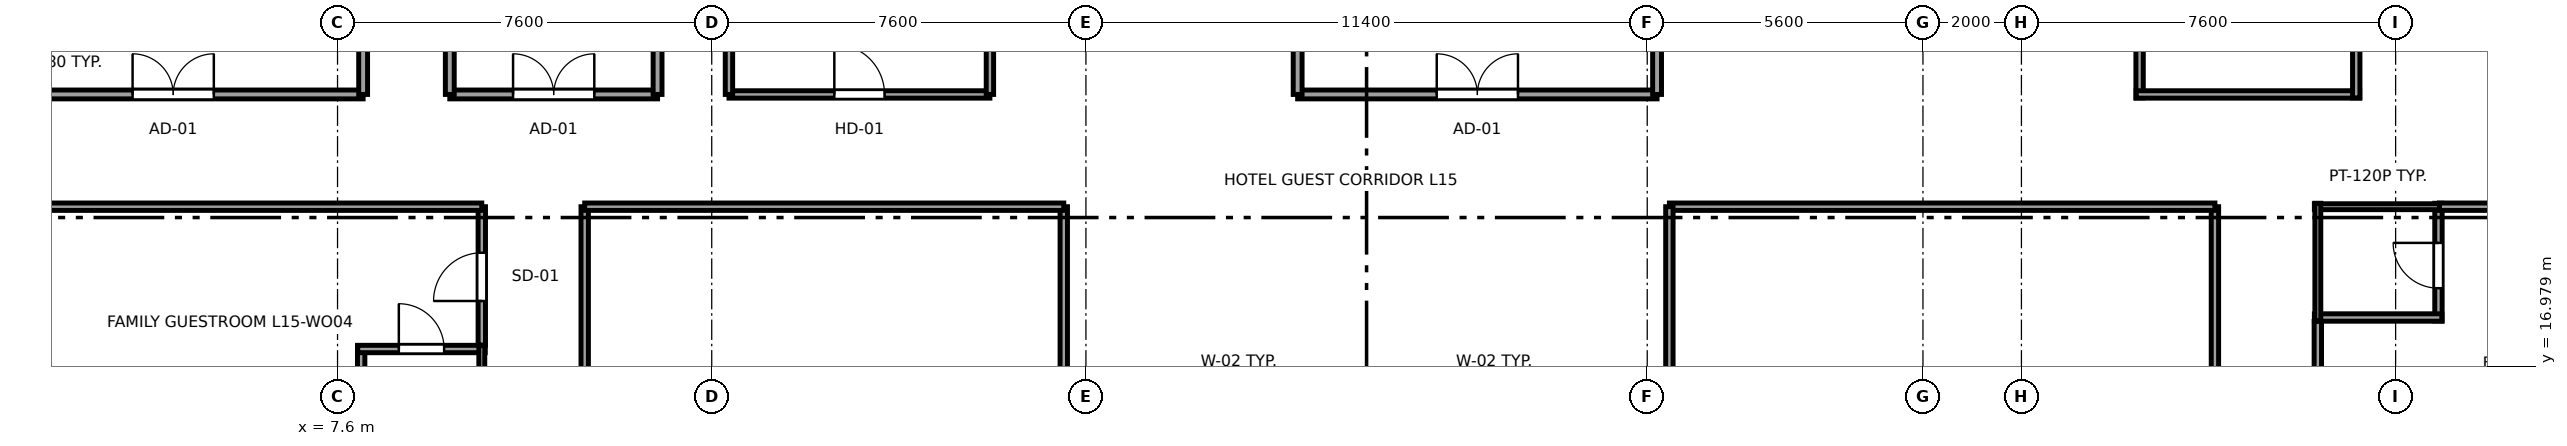
"""IFC4 building model, lengths in metres.
Left out: names, types, materials, properties, quantities, classifications, styles, units other than length and angle.
Written with IfcOpenShell. Run it as: python <this file> out.ifc"""

import sys

from ifc_helpers import new_model, si_unit, direction, frame, frame_2d, origin, place, context, subcontext, project, spatial, rectangle, extrude, source, transform, mapped, element, fill, save


model = new_model("IFC4")
c1 = context("Model", 3, precision=1e-05, world=origin(), true_north=direction((0.0, 1.0)))
c2 = subcontext(c1, "Body", "Model", "MODEL_VIEW")
j1 = project(units=[si_unit("LENGTHUNIT", "METRE"), si_unit("PLANEANGLEUNIT", "RADIAN")], contexts=[c1])
p1 = place(None, origin())
s1 = spatial("IfcSite", under=j1, at=p1, CompositionType="ELEMENT")
p2 = place(p1, origin())
s2 = spatial("IfcBuilding", under=s1, at=p2, CompositionType="ELEMENT")
p3 = place(p2, frame((0.0, 0.0, 63.95)))
s3 = spatial("IfcBuildingStorey", under=s2, at=p3, CompositionType="ELEMENT", Elevation=63.95)
p4 = place(p3, frame((8.08, 15.41, 0.0), z_axis=(0.0, 0.0, 1.0), x_axis=(0.0, 1.0, 0.0)))
e1 = element("IfcWall", 1, at=p4, inside=s3, PredefinedType="PARTITIONING", context=c2, shape_type="SweptSolid", body=[
    extrude(rectangle(XDim=1.99, YDim=0.15, at=frame_2d((0.995, 0.0))), origin(), (0.0, 0.0, 1.0), 3.37),
])
p5 = place(p3, frame((8.01, 17.33, 0.0), z_axis=(0.0, 0.0, 1.0), x_axis=(1.0, 0.0, 0.0)))
e2 = element("IfcWall", 2, at=p5, inside=s3, PredefinedType="PARTITIONING", context=c2, shape_type="SweptSolid", body=[
    extrude(rectangle(XDim=2.59, YDim=0.15, at=frame_2d((1.295, 0.0))), origin(), (0.0, 0.0, 1.0), 3.37),
])
p6 = place(p5, frame((0.835, 0.0, 0.0)))
e3 = element("IfcOpeningElement", 3, at=p6, cuts=e2, PredefinedType="OPENING", context=c2, shape_type="SweptSolid", body=[
    extrude(rectangle(XDim=0.92, YDim=2.01, at=frame_2d((0.46, 1.005))), frame((0.0, 0.085, 0.0), z_axis=(0.0, -1.0, 0.0), x_axis=(1.0, 0.0, 0.0)), (0.0, 0.0, 1.0), 0.17),
])
p7 = place(p3, frame((10.53, 15.41, 0.0), z_axis=(0.0, 0.0, 1.0), x_axis=(0.0, 1.0, 0.0)))
e4 = element("IfcWall", 4, at=p7, inside=s3, PredefinedType="PLUMBINGWALL", context=c2, shape_type="SweptSolid", body=[
    extrude(rectangle(XDim=1.99, YDim=0.12, at=frame_2d((0.995, 0.0))), origin(), (0.0, 0.0, 1.0), 3.37),
])
p8 = place(p3, frame((50.27, 17.9, 0.0), z_axis=(0.0, 0.0, 1.0), x_axis=(0.0, 1.0, 0.0)))
e5 = element("IfcWall", 5, at=p8, inside=s3, PredefinedType="PARTITIONING", context=c2, shape_type="SweptSolid", body=[
    extrude(rectangle(XDim=2.39, YDim=0.15, at=frame_2d((1.195, 0.0))), origin(), (0.0, 0.0, 1.0), 3.37),
])
p9 = place(p8, frame((0.665, 0.0, 0.0)))
e6 = element("IfcOpeningElement", 6, at=p9, cuts=e5, PredefinedType="OPENING", context=c2, shape_type="SweptSolid", body=[
    extrude(rectangle(XDim=0.92, YDim=2.01, at=frame_2d((0.46, 1.005))), frame((0.0, 0.085, 0.0), z_axis=(0.0, -1.0, 0.0), x_axis=(1.0, 0.0, 0.0)), (0.0, 0.0, 1.0), 0.17),
])
p10 = place(p3, frame((47.75, 17.97, 0.0), z_axis=(0.0, 0.0, 1.0), x_axis=(1.0, 0.0, 0.0)))
e7 = element("IfcWall", 7, at=p10, inside=s3, PredefinedType="PARTITIONING", context=c2, shape_type="SweptSolid", body=[
    extrude(rectangle(XDim=2.59, YDim=0.15, at=frame_2d((1.295, 0.0))), origin(), (0.0, 0.0, 1.0), 3.37),
])
p11 = place(p3, frame((47.75, 20.22, 0.0), z_axis=(0.0, 0.0, 1.0), x_axis=(1.0, 0.0, 0.0)))
e8 = element("IfcWall", 8, at=p11, inside=s3, PredefinedType="PLUMBINGWALL", context=c2, shape_type="SweptSolid", body=[
    extrude(rectangle(XDim=2.59, YDim=0.12, at=frame_2d((1.295, 0.0))), origin(), (0.0, 0.0, 1.0), 3.37),
])
p12 = place(p3, frame((47.82, 17.9, 0.0), z_axis=(0.0, 0.0, 1.0), x_axis=(0.0, 1.0, 0.0)))
e9 = element("IfcWall", 9, at=p12, inside=s3, PredefinedType="PLUMBINGWALL", context=c2, shape_type="SweptSolid", body=[
    extrude(rectangle(XDim=2.39, YDim=0.12, at=frame_2d((1.195, 0.0))), origin(), (0.0, 0.0, 1.0), 3.37),
])
p13 = place(p3, frame((10.53, 17.41, 0.0), z_axis=(0.0, 0.0, 1.0), x_axis=(0.0, 1.0, 0.0)))
e10 = element("IfcWall", 10, at=p13, inside=s3, PredefinedType="PARTITIONING", context=c2, shape_type="SweptSolid", body=[
    extrude(rectangle(XDim=2.81, YDim=0.15, at=frame_2d((1.405, 0.0))), origin(), (0.0, 0.0, 1.0), 3.37),
])
p14 = place(p13, frame((0.895, 0.0, 0.0)))
e11 = element("IfcOpeningElement", 11, at=p14, cuts=e10, PredefinedType="OPENING", context=c2, shape_type="SweptSolid", body=[
    extrude(rectangle(XDim=0.98, YDim=2.12, at=frame_2d((0.49, 1.06))), frame((0.0, 0.085, 0.0), z_axis=(0.0, -1.0, 0.0), x_axis=(1.0, 0.0, 0.0)), (0.0, 0.0, 1.0), 0.17),
])
p15 = place(p3, frame((0.405, 20.22, 0.0), z_axis=(0.0, 0.0, 1.0), x_axis=(1.0, 0.0, 0.0)))
e12 = element("IfcWall", 12, at=p15, inside=s3, PredefinedType="PARTITIONING", context=c2, shape_type="SweptSolid", body=[
    extrude(rectangle(XDim=10.125, YDim=0.15, at=frame_2d((5.062, 0.0))), origin(), (0.0, 0.0, 1.0), 3.37),
])
p16 = place(p3, frame((12.62, 12.21, 0.0), z_axis=(0.0, 0.0, 1.0), x_axis=(0.0, 1.0, 0.0)))
e13 = element("IfcWall", 13, at=p16, inside=s3, PredefinedType="PARTITIONING", context=c2, shape_type="SweptSolid", body=[
    extrude(rectangle(XDim=8.01, YDim=0.15, at=frame_2d((4.005, 0.0))), origin(), (0.0, 0.0, 1.0), 3.37),
])
p17 = place(p16, frame((3.495, 0.0, 0.0)))
e14 = element("IfcOpeningElement", 14, at=p17, cuts=e13, PredefinedType="OPENING", context=c2, shape_type="SweptSolid", body=[
    extrude(rectangle(XDim=0.98, YDim=2.12, at=frame_2d((0.49, 1.06))), frame((0.0, 0.085, 0.0), z_axis=(0.0, -1.0, 0.0), x_axis=(1.0, 0.0, 0.0)), (0.0, 0.0, 1.0), 0.17),
])
p18 = place(p3, frame((22.35, 9.88, 0.0), z_axis=(0.0, 0.0, 1.0), x_axis=(0.0, 1.0, 0.0)))
e15 = element("IfcWall", 15, at=p18, inside=s3, PredefinedType="PARTITIONING", context=c2, shape_type="SweptSolid", body=[
    extrude(rectangle(XDim=10.34, YDim=0.15, at=frame_2d((5.17, 0.0))), origin(), (0.0, 0.0, 1.0), 3.37),
])
p19 = place(p3, frame((12.62, 20.22, 0.0), z_axis=(0.0, 0.0, 1.0), x_axis=(1.0, 0.0, 0.0)))
e16 = element("IfcWall", 16, at=p19, inside=s3, PredefinedType="PARTITIONING", context=c2, shape_type="SweptSolid", body=[
    extrude(rectangle(XDim=9.73, YDim=0.15, at=frame_2d((4.865, 0.0))), origin(), (0.0, 0.0, 1.0), 2.954),
])
p20 = place(p3, frame((45.73, 12.61, 0.0), z_axis=(0.0, 0.0, 1.0), x_axis=(0.0, 1.0, 0.0)))
e17 = element("IfcWall", 17, at=p20, inside=s3, PredefinedType="PARTITIONING", context=c2, shape_type="SweptSolid", body=[
    extrude(rectangle(XDim=7.61, YDim=0.15, at=frame_2d((3.805, 0.0))), origin(), (0.0, 0.0, 1.0), 2.954),
])
p21 = place(p20, frame((3.295, 0.0, 0.0)))
e18 = element("IfcOpeningElement", 18, at=p21, cuts=e17, PredefinedType="OPENING", context=c2, shape_type="SweptSolid", body=[
    extrude(rectangle(XDim=0.98, YDim=2.12, at=frame_2d((0.49, 1.06))), frame((0.0, 0.085, 0.0), z_axis=(0.0, -1.0, 0.0), x_axis=(1.0, 0.0, 0.0)), (0.0, 0.0, 1.0), 0.17),
])
p22 = place(p3, frame((34.65, 20.22, 0.0), z_axis=(0.0, 0.0, 1.0), x_axis=(1.0, 0.0, 0.0)))
e19 = element("IfcWall", 19, at=p22, inside=s3, PredefinedType="PARTITIONING", context=c2, shape_type="SweptSolid", body=[
    extrude(rectangle(XDim=11.08, YDim=0.15, at=frame_2d((5.54, 0.0))), origin(), (0.0, 0.0, 1.0), 2.954),
])
p23 = place(p3, frame((34.65, 10.28, 0.0), z_axis=(0.0, 0.0, 1.0), x_axis=(0.0, 1.0, 0.0)))
e20 = element("IfcWall", 20, at=p23, inside=s3, PredefinedType="PARTITIONING", context=c2, shape_type="SweptSolid", body=[
    extrude(rectangle(XDim=9.94, YDim=0.15, at=frame_2d((4.97, 0.0))), origin(), (0.0, 0.0, 1.0), 3.37),
])
p24 = place(p3, frame((47.82, 13.88, 0.0), z_axis=(0.0, 0.0, 1.0), x_axis=(0.0, 1.0, 0.0)))
e21 = element("IfcWall", 21, at=p24, inside=s3, PredefinedType="PARTITIONING", context=c2, shape_type="SweptSolid", body=[
    extrude(rectangle(XDim=4.01, YDim=0.15, at=frame_2d((2.005, 0.0))), origin(), (0.0, 0.0, 1.0), 3.37),
])
p25 = place(p24, frame((1.495, 0.0, 0.0)))
e22 = element("IfcOpeningElement", 22, at=p25, cuts=e21, PredefinedType="OPENING", context=c2, shape_type="SweptSolid", body=[
    extrude(rectangle(XDim=0.98, YDim=2.12, at=frame_2d((0.49, 1.06))), frame((0.0, 0.085, 0.0), z_axis=(0.0, -1.0, 0.0), x_axis=(1.0, 0.0, 0.0)), (0.0, 0.0, 1.0), 0.17),
])
p26 = place(p3, frame((50.29, 20.22, 0.0), z_axis=(0.0, 0.0, 1.0), x_axis=(1.0, 0.0, 0.0)))
e23 = element("IfcWall", 23, at=p26, inside=s3, PredefinedType="PARTITIONING", context=c2, shape_type="SweptSolid", body=[
    extrude(rectangle(XDim=6.305, YDim=0.15, at=frame_2d((3.152, 0.0))), origin(), (0.0, 0.0, 1.0), 3.37),
])
p27 = place(p3, frame((0.405, 22.5, 0.0), z_axis=(0.0, 0.0, 1.0), x_axis=(1.0, 0.0, 0.0)))
e24 = element("IfcWall", 24, at=p27, inside=s3, PredefinedType="PARTITIONING", context=c2, shape_type="SweptSolid", body=[
    extrude(rectangle(XDim=7.715, YDim=0.18, at=frame_2d((3.857, 0.0))), origin(), (0.0, 0.0, 1.0), 3.37),
])
p28 = place(p27, frame((3.032, 0.0, 0.0)))
e25 = element("IfcOpeningElement", 25, at=p28, cuts=e24, PredefinedType="OPENING", context=c2, shape_type="SweptSolid", body=[
    extrude(rectangle(XDim=1.65, YDim=2.15, at=frame_2d((0.825, 1.075))), frame((0.0, 0.1, 0.0), z_axis=(0.0, -1.0, 0.0), x_axis=(1.0, 0.0, 0.0)), (0.0, 0.0, 1.0), 0.2),
])
p29 = place(p3, frame((8.12, 22.5, 0.0), z_axis=(0.0, 0.0, 1.0), x_axis=(0.0, 1.0, 0.0)))
e26 = element("IfcWall", 26, at=p29, inside=s3, PredefinedType="PARTITIONING", context=c2, shape_type="SweptSolid", body=[
    extrude(rectangle(XDim=1.9, YDim=0.18, at=frame_2d((0.95, 0.0))), origin(), (0.0, 0.0, 1.0), 3.37),
])
p30 = place(p3, frame((44.2, 22.43, 0.0), z_axis=(0.0, 0.0, 1.0), x_axis=(0.0, 1.0, 0.0)))
e27 = element("IfcWall", 27, at=p30, inside=s3, PredefinedType="PARTITIONING", context=c2, shape_type="SweptSolid", body=[
    extrude(rectangle(XDim=3.94, YDim=0.15, at=frame_2d((1.97, 0.0))), origin(), (0.0, 0.0, 1.0), 3.37),
])
p31 = place(p30, frame((1.34, 0.0, 0.0)))
e28 = element("IfcOpeningElement", 28, at=p31, cuts=e27, PredefinedType="OPENING", context=c2, shape_type="SweptSolid", body=[
    extrude(rectangle(XDim=0.92, YDim=2.01, at=frame_2d((0.46, 1.005))), frame((0.0, 0.085, 0.0), z_axis=(0.0, -1.0, 0.0), x_axis=(1.0, 0.0, 0.0)), (0.0, 0.0, 1.0), 0.17),
])
p32 = place(p3, frame((44.13, 22.5, 0.0), z_axis=(0.0, 0.0, 1.0), x_axis=(1.0, 0.0, 0.0)))
e29 = element("IfcWall", 29, at=p32, inside=s3, PredefinedType="PARTITIONING", context=c2, shape_type="SweptSolid", body=[
    extrude(rectangle(XDim=4.54, YDim=0.15, at=frame_2d((2.27, 0.0))), origin(), (0.0, 0.0, 1.0), 3.37),
])
p33 = place(p3, frame((48.6, 22.43, 0.0), z_axis=(0.0, 0.0, 1.0), x_axis=(0.0, 1.0, 0.0)))
e30 = element("IfcWall", 30, at=p33, inside=s3, PredefinedType="PARTITIONING", context=c2, shape_type="SweptSolid", body=[
    extrude(rectangle(XDim=3.94, YDim=0.15, at=frame_2d((1.97, 0.0))), origin(), (0.0, 0.0, 1.0), 3.37),
])
p34 = place(p3, frame((9.88, 22.5, 0.0), z_axis=(0.0, 0.0, 1.0), x_axis=(1.0, 0.0, 0.0)))
e31 = element("IfcWall", 31, at=p34, inside=s3, PredefinedType="PARTITIONING", context=c2, shape_type="SweptSolid", body=[
    extrude(rectangle(XDim=4.22, YDim=0.18, at=frame_2d((2.11, 0.0))), origin(), (0.0, 0.0, 1.0), 3.37),
])
p35 = place(p34, frame((1.285, 0.0, 0.0)))
e32 = element("IfcOpeningElement", 32, at=p35, cuts=e31, PredefinedType="OPENING", context=c2, shape_type="SweptSolid", body=[
    extrude(rectangle(XDim=1.65, YDim=2.15, at=frame_2d((0.825, 1.075))), frame((0.0, 0.1, 0.0), z_axis=(0.0, -1.0, 0.0), x_axis=(1.0, 0.0, 0.0)), (0.0, 0.0, 1.0), 0.2),
])
for number, where, z_axis, x_axis in (
    (33, (9.88, 22.5, 0.0), (0.0, 0.0, 1.0), (0.0, 1.0, 0.0)),
    (34, (14.1, 22.5, 0.0), (0.0, 0.0, 1.0), (0.0, 1.0, 0.0)),
):
    element("IfcWall", number, at=place(p3, frame(where, z_axis=z_axis, x_axis=x_axis)), inside=s3, PredefinedType="PARTITIONING", context=c2, shape_type="SweptSolid", body=[
        extrude(rectangle(XDim=7.25, YDim=0.18, at=frame_2d((3.625, 0.0))), origin(), (0.0, 0.0, 1.0), 3.37),
    ])
p36 = place(p3, frame((27.1, 22.5, 0.0), z_axis=(0.0, 0.0, 1.0), x_axis=(1.0, 0.0, 0.0)))
e35 = element("IfcWall", 35, at=p36, inside=s3, PredefinedType="PARTITIONING", context=c2, shape_type="SweptSolid", body=[
    extrude(rectangle(XDim=7.3, YDim=0.18, at=frame_2d((3.65, 0.0))), origin(), (0.0, 0.0, 1.0), 3.37),
])
p37 = place(p36, frame((2.825, 0.0, 0.0)))
e36 = element("IfcOpeningElement", 36, at=p37, cuts=e35, PredefinedType="OPENING", context=c2, shape_type="SweptSolid", body=[
    extrude(rectangle(XDim=1.65, YDim=2.15, at=frame_2d((0.825, 1.075))), frame((0.0, 0.1, 0.0), z_axis=(0.0, -1.0, 0.0), x_axis=(1.0, 0.0, 0.0)), (0.0, 0.0, 1.0), 0.2),
])
for number, where, z_axis, x_axis in (
    (37, (27.1, 22.5, 0.0), (0.0, 0.0, 1.0), (0.0, 1.0, 0.0)),
    (38, (34.4, 22.5, 0.0), (0.0, 0.0, 1.0), (0.0, 1.0, 0.0)),
):
    element("IfcWall", number, at=place(p3, frame(where, z_axis=z_axis, x_axis=x_axis)), inside=s3, PredefinedType="PARTITIONING", context=c2, shape_type="SweptSolid", body=[
        extrude(rectangle(XDim=7.3, YDim=0.18, at=frame_2d((3.65, 0.0))), origin(), (0.0, 0.0, 1.0), 3.37),
    ])
p38 = place(p3, frame((15.55, 22.5, 0.0), z_axis=(0.0, 0.0, 1.0), x_axis=(1.0, 0.0, 0.0)))
e39 = element("IfcWall", 39, at=p38, inside=s3, PredefinedType="PARTITIONING", context=c2, shape_type="SweptSolid", body=[
    extrude(rectangle(XDim=5.3, YDim=0.15, at=frame_2d((2.65, 0.0))), origin(), (0.0, 0.0, 1.0), 3.37),
])
p39 = place(p38, frame((2.14, 0.0, 0.0)))
e40 = element("IfcOpeningElement", 40, at=p39, cuts=e39, PredefinedType="OPENING", context=c2, shape_type="SweptSolid", body=[
    extrude(rectangle(XDim=1.02, YDim=2.03, at=frame_2d((0.51, 1.015))), frame((0.0, 0.085, 0.0), z_axis=(0.0, -1.0, 0.0), x_axis=(1.0, 0.0, 0.0)), (0.0, 0.0, 1.0), 0.17),
])
for number, where, z_axis, x_axis in (
    (41, (15.55, 22.5, 0.0), (0.0, 0.0, 1.0), (0.0, 1.0, 0.0)),
    (42, (20.85, 22.5, 0.0), (0.0, 0.0, 1.0), (0.0, 1.0, 0.0)),
):
    element("IfcWall", number, at=place(p3, frame(where, z_axis=z_axis, x_axis=x_axis)), inside=s3, PredefinedType="PARTITIONING", context=c2, shape_type="SweptSolid", body=[
        extrude(rectangle(XDim=7.3, YDim=0.15, at=frame_2d((3.65, 0.0))), origin(), (0.0, 0.0, 1.0), 3.37),
    ])
m1 = source(origin(), c2, "Body", "SweptSolid", [
    extrude(rectangle(XDim=0.92, YDim=2.01, at=frame_2d((0.46, 1.005))), frame((0.0, 0.025, 0.0), z_axis=(0.0, -1.0, 0.0), x_axis=(1.0, 0.0, 0.0)), (0.0, 0.0, 1.0), 0.05),
])
p40 = place(p6, origin())
e43 = element("IfcDoor", 43, at=p40, inside=s3, OperationType="SINGLE_SWING_LEFT", PredefinedType="DOOR", context=c2, shape_type="MappedRepresentation", body=[
    mapped(m1, transform((0.0, 0.0, 0.0), x_axis=(1.0, 0.0, 0.0), y_axis=(0.0, 1.0, 0.0), z_axis=(0.0, 0.0, 1.0), scale=1.0)),
])
fill(e3, e43)
p41 = place(p9, origin())
e44 = element("IfcDoor", 44, at=p41, inside=s3, OperationType="SINGLE_SWING_RIGHT", PredefinedType="DOOR", context=c2, shape_type="MappedRepresentation", body=[
    mapped(m1, transform((0.0, 0.0, 0.0), x_axis=(1.0, 0.0, 0.0), y_axis=(0.0, 1.0, 0.0), z_axis=(0.0, 0.0, 1.0), scale=1.0)),
])
fill(e6, e44)
m2 = source(origin(), c2, "Body", "SweptSolid", [
    extrude(rectangle(XDim=0.98, YDim=2.12, at=frame_2d((0.49, 1.06))), frame((0.0, 0.025, 0.0), z_axis=(0.0, -1.0, 0.0), x_axis=(1.0, 0.0, 0.0)), (0.0, 0.0, 1.0), 0.05),
])
p42 = place(p14, origin())
e45 = element("IfcDoor", 45, at=p42, inside=s3, OperationType="SINGLE_SWING_LEFT", PredefinedType="DOOR", context=c2, shape_type="MappedRepresentation", body=[
    mapped(m2, transform((0.0, 0.0, 0.0), x_axis=(1.0, 0.0, 0.0), y_axis=(0.0, 1.0, 0.0), z_axis=(0.0, 0.0, 1.0), scale=1.0)),
])
fill(e11, e45)
m3 = source(origin(), c2, "Body", "SweptSolid", [
    extrude(rectangle(XDim=1.65, YDim=2.15, at=frame_2d((0.825, 1.075))), frame((0.0, 0.025, 0.0), z_axis=(0.0, -1.0, 0.0), x_axis=(1.0, 0.0, 0.0)), (0.0, 0.0, 1.0), 0.05),
])
p43 = place(p28, origin())
e46 = element("IfcDoor", 46, at=p43, inside=s3, OperationType="DOUBLE_DOOR_SINGLE_SWING", PredefinedType="DOOR", context=c2, shape_type="MappedRepresentation", body=[
    mapped(m3, transform((0.0, 0.0, 0.0), x_axis=(1.0, 0.0, 0.0), y_axis=(0.0, 1.0, 0.0), z_axis=(0.0, 0.0, 1.0), scale=1.0)),
])
fill(e25, e46)
p44 = place(p35, origin())
e47 = element("IfcDoor", 47, at=p44, inside=s3, OperationType="DOUBLE_DOOR_SINGLE_SWING", PredefinedType="DOOR", context=c2, shape_type="MappedRepresentation", body=[
    mapped(m3, transform((0.0, 0.0, 0.0), x_axis=(1.0, 0.0, 0.0), y_axis=(0.0, 1.0, 0.0), z_axis=(0.0, 0.0, 1.0), scale=1.0)),
])
fill(e32, e47)
p45 = place(p37, origin())
e48 = element("IfcDoor", 48, at=p45, inside=s3, OperationType="DOUBLE_DOOR_SINGLE_SWING", PredefinedType="DOOR", context=c2, shape_type="MappedRepresentation", body=[
    mapped(m3, transform((0.0, 0.0, 0.0), x_axis=(1.0, 0.0, 0.0), y_axis=(0.0, 1.0, 0.0), z_axis=(0.0, 0.0, 1.0), scale=1.0)),
])
fill(e36, e48)
m4 = source(origin(), c2, "Body", "SweptSolid", [
    extrude(rectangle(XDim=1.02, YDim=2.03, at=frame_2d((0.51, 1.015))), frame((0.0, 0.025, 0.0), z_axis=(0.0, -1.0, 0.0), x_axis=(1.0, 0.0, 0.0)), (0.0, 0.0, 1.0), 0.05),
])
p46 = place(p39, origin())
e49 = element("IfcDoor", 49, at=p46, inside=s3, OperationType="SINGLE_SWING_LEFT", PredefinedType="DOOR", context=c2, shape_type="MappedRepresentation", body=[
    mapped(m4, transform((0.0, 0.0, 0.0), x_axis=(1.0, 0.0, 0.0), y_axis=(0.0, 1.0, 0.0), z_axis=(0.0, 0.0, 1.0), scale=1.0)),
])
fill(e40, e49)
save(model, sys.argv[1])
